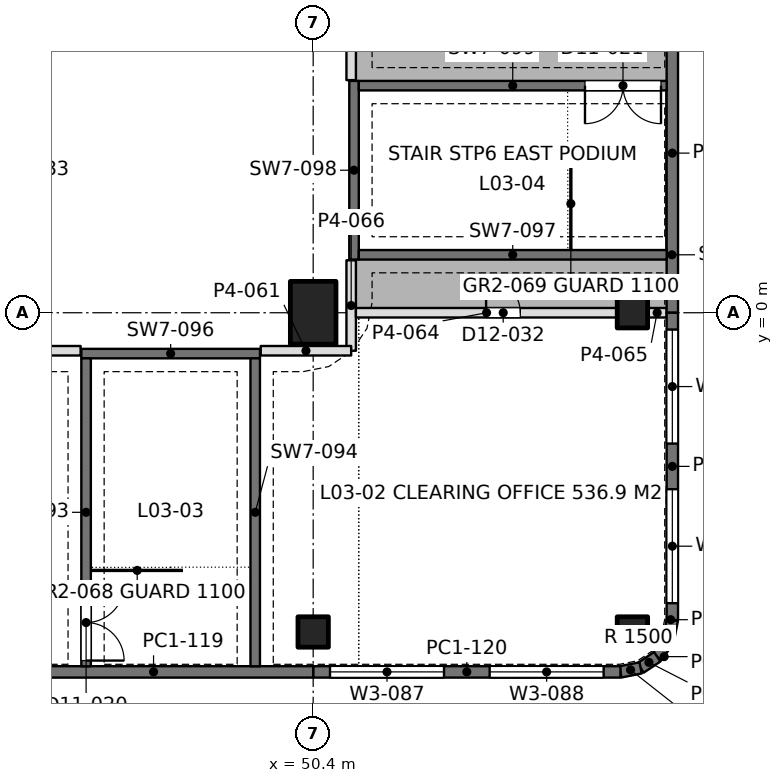
"""IFC4 building model, lengths in metres.
Left out: names, types, materials, properties, quantities, classifications, styles, units other than length and angle.
Written with IfcOpenShell. Run it as: python <this file> out.ifc"""

import sys

from ifc_helpers import new_model, si_unit, direction, frame, frame_2d, origin, origin_2d, place, context, subcontext, project, spatial, rectangle, extrude, element, fill, save


model = new_model("IFC4")
c1 = context("Model", 3, precision=1e-05, world=origin(), true_north=direction((0.0, 1.0)))
c2 = subcontext(c1, "Body", "Model", "MODEL_VIEW")
j1 = project(units=[si_unit("LENGTHUNIT", "METRE"), si_unit("PLANEANGLEUNIT", "RADIAN")], contexts=[c1])
p1 = place(None, origin())
s1 = spatial("IfcSite", under=j1, at=p1, CompositionType="ELEMENT")
p2 = place(p1, origin())
s2 = spatial("IfcBuilding", under=s1, at=p2, CompositionType="ELEMENT")
p3 = place(p2, frame((0.0, 0.0, 14.4)))
s3 = spatial("IfcBuildingStorey", under=s2, at=p3, CompositionType="ELEMENT", Elevation=14.4)
p4 = place(p3, frame((50.4, -8.4, 0.0), z_axis=(0.0, 0.0, 1.0), x_axis=(1.0, 0.0, 0.0)))
e1 = element("IfcColumn", 1, at=p4, inside=s3, PredefinedType="COLUMN", context=c2, shape_type="SweptSolid", body=[
    extrude(rectangle(XDim=0.8, YDim=0.8, at=origin_2d()), origin(), (0.0, 0.0, 1.0), 4.5),
])
p5 = place(p3, frame((50.4, 0.0, 0.0), z_axis=(0.0, 0.0, 1.0), x_axis=(1.0, 0.0, 0.0)))
e2 = element("IfcColumn", 2, at=p5, inside=s3, PredefinedType="COLUMN", context=c2, shape_type="SweptSolid", body=[
    extrude(rectangle(XDim=1.2, YDim=1.65, at=origin_2d()), origin(), (0.0, 0.0, 1.0), 4.5),
])
for number, where, z_axis, x_axis in (
    (3, (58.8, -8.4, 0.0), (0.0, 0.0, 1.0), (1.0, 0.0, 0.0)),
    (4, (58.8, 0.0, 0.0), (0.0, 0.0, 1.0), (1.0, 0.0, 0.0)),
):
    element("IfcColumn", number, at=place(p3, frame(where, z_axis=z_axis, x_axis=x_axis)), inside=s3, PredefinedType="COLUMN", context=c2, shape_type="SweptSolid", body=[
        extrude(rectangle(XDim=0.8, YDim=0.8, at=origin_2d()), origin(), (0.0, 0.0, 1.0), 4.5),
    ])
p6 = place(p3, frame((58.485, -9.45, 0.0), z_axis=(0.0, 0.0, 1.0), x_axis=(-1.0, 0.0, 0.0)))
e5 = element("IfcWall", 5, at=p6, inside=s3, PredefinedType="SOLIDWALL", context=c2, shape_type="SweptSolid", body=[
    extrude(rectangle(XDim=8.085, YDim=0.3, at=frame_2d((4.042, 0.0))), origin(), (0.0, 0.0, 1.0), 4.25),
])
p7 = place(p6, frame((0.443, 0.0, 0.9)))
e6 = element("IfcOpeningElement", 6, at=p7, cuts=e5, PredefinedType="OPENING", context=c2, shape_type="SweptSolid", body=[
    extrude(rectangle(XDim=3.0, YDim=2.4, at=frame_2d((1.5, 1.2))), frame((0.0, 0.16, 0.0), z_axis=(0.0, -1.0, 0.0), x_axis=(1.0, 0.0, 0.0)), (0.0, 0.0, 1.0), 0.32),
])
p8 = place(p6, frame((4.643, 0.0, 0.9)))
e7 = element("IfcOpeningElement", 7, at=p8, cuts=e5, PredefinedType="OPENING", context=c2, shape_type="SweptSolid", body=[
    extrude(rectangle(XDim=3.0, YDim=2.4, at=frame_2d((1.5, 1.2))), frame((0.0, 0.16, 0.0), z_axis=(0.0, -1.0, 0.0), x_axis=(1.0, 0.0, 0.0)), (0.0, 0.0, 1.0), 0.32),
])
for number, where, z_axis, x_axis in (
    (8, (50.4, -9.45, 0.0), (0.0, 0.0, 1.0), (-1.0, 0.0, 0.0)),
    (9, (59.85, 8.4, 0.0), (0.0, 0.0, 1.0), (0.0, -1.0, 0.0)),
):
    element("IfcWall", number, at=place(p3, frame(where, z_axis=z_axis, x_axis=x_axis)), inside=s3, PredefinedType="SOLIDWALL", context=c2, shape_type="SweptSolid", body=[
        extrude(rectangle(XDim=8.4, YDim=0.3, at=frame_2d((4.2, 0.0))), origin(), (0.0, 0.0, 1.0), 4.25),
    ])
p9 = place(p3, frame((59.85, 0.0, 0.0), z_axis=(0.0, 0.0, 1.0), x_axis=(0.0, -1.0, 0.0)))
e10 = element("IfcWall", 10, at=p9, inside=s3, PredefinedType="SOLIDWALL", context=c2, shape_type="SweptSolid", body=[
    extrude(rectangle(XDim=8.085, YDim=0.3, at=frame_2d((4.042, 0.0))), origin(), (0.0, 0.0, 1.0), 4.25),
])
p10 = place(p9, frame((0.443, 0.0, 0.9)))
e11 = element("IfcOpeningElement", 11, at=p10, cuts=e10, PredefinedType="OPENING", context=c2, shape_type="SweptSolid", body=[
    extrude(rectangle(XDim=3.0, YDim=2.4, at=frame_2d((1.5, 1.2))), frame((0.0, 0.16, 0.0), z_axis=(0.0, -1.0, 0.0), x_axis=(1.0, 0.0, 0.0)), (0.0, 0.0, 1.0), 0.32),
])
p11 = place(p9, frame((4.643, 0.0, 0.9)))
e12 = element("IfcOpeningElement", 12, at=p11, cuts=e10, PredefinedType="OPENING", context=c2, shape_type="SweptSolid", body=[
    extrude(rectangle(XDim=3.0, YDim=2.4, at=frame_2d((1.5, 1.2))), frame((0.0, 0.16, 0.0), z_axis=(0.0, -1.0, 0.0), x_axis=(1.0, 0.0, 0.0)), (0.0, 0.0, 1.0), 0.32),
])
p12 = place(p3, frame((59.85, -8.085, 0.0), z_axis=(0.0, 0.0, 1.0), x_axis=(-0.1955082817, -0.980702050465, 0.0)))
e13 = element("IfcWall", 13, at=p12, inside=s3, PredefinedType="SOLIDWALL", context=c2, shape_type="SweptSolid", body=[
    extrude(rectangle(XDim=0.541, YDim=0.3, at=frame_2d((0.271, 0.0))), origin(), (0.0, 0.0, 1.0), 4.25),
])
p13 = place(p3, frame((59.744, -8.615, 0.0), z_axis=(0.0, 0.0, 1.0), x_axis=(-0.555236195849, -0.831692711774, 0.0)))
e14 = element("IfcWall", 14, at=p13, inside=s3, PredefinedType="SOLIDWALL", context=c2, shape_type="SweptSolid", body=[
    extrude(rectangle(XDim=0.525, YDim=0.3, at=frame_2d((0.263, 0.0))), origin(), (0.0, 0.0, 1.0), 4.25),
])
p14 = place(p3, frame((59.453, -9.052, 0.0), z_axis=(0.0, 0.0, 1.0), x_axis=(-0.831621430339, -0.55534295404, 0.0)))
e15 = element("IfcWall", 15, at=p14, inside=s3, PredefinedType="SOLIDWALL", context=c2, shape_type="SweptSolid", body=[
    extrude(rectangle(XDim=0.526, YDim=0.3, at=frame_2d((0.263, 0.0))), origin(), (0.0, 0.0, 1.0), 4.25),
])
p15 = place(p3, frame((59.015, -9.344, 0.0), z_axis=(0.0, 0.0, 1.0), x_axis=(-0.980788534345, -0.195073962632, 0.0)))
e16 = element("IfcWall", 16, at=p15, inside=s3, PredefinedType="SOLIDWALL", context=c2, shape_type="SweptSolid", body=[
    extrude(rectangle(XDim=0.541, YDim=0.3, at=frame_2d((0.271, 0.0))), origin(), (0.0, 0.0, 1.0), 4.25),
])
p16 = place(p3, frame((6.12, -1.0, 0.0), z_axis=(0.0, 0.0, 1.0), x_axis=(1.0, 0.0, 0.0)))
e17 = element("IfcWall", 17, at=p16, inside=s3, PredefinedType="PARTITIONING", context=c2, shape_type="SweptSolid", body=[
    extrude(rectangle(XDim=38.16, YDim=0.25, at=frame_2d((19.08, 0.0))), origin(), (0.0, 0.0, 1.0), 3.45),
])
p17 = place(p16, frame((13.88, 0.0, 0.0)))
e18 = element("IfcOpeningElement", 18, at=p17, cuts=e17, PredefinedType="OPENING", context=c2, shape_type="SweptSolid", body=[
    extrude(rectangle(XDim=2.0, YDim=2.4, at=frame_2d((1.0, 1.2))), frame((0.0, 0.135, 0.0), z_axis=(0.0, -1.0, 0.0), x_axis=(1.0, 0.0, 0.0)), (0.0, 0.0, 1.0), 0.27),
])
p18 = place(p16, frame((22.28, 0.0, 0.0)))
e19 = element("IfcOpeningElement", 19, at=p18, cuts=e17, PredefinedType="OPENING", context=c2, shape_type="SweptSolid", body=[
    extrude(rectangle(XDim=2.0, YDim=2.4, at=frame_2d((1.0, 1.2))), frame((0.0, 0.135, 0.0), z_axis=(0.0, -1.0, 0.0), x_axis=(1.0, 0.0, 0.0)), (0.0, 0.0, 1.0), 0.27),
])
p19 = place(p3, frame((49.02, -1.0, 0.0), z_axis=(0.0, 0.0, 1.0), x_axis=(1.0, 0.0, 0.0)))
e20 = element("IfcWall", 20, at=p19, inside=s3, PredefinedType="PARTITIONING", context=c2, shape_type="SweptSolid", body=[
    extrude(rectangle(XDim=2.38, YDim=0.25, at=frame_2d((1.19, 0.0))), origin(), (0.0, 0.0, 1.0), 3.6),
])
p20 = place(p3, frame((51.524, 0.0, 0.0), z_axis=(0.0, 0.0, 1.0), x_axis=(1.0, 0.0, 0.0)))
e21 = element("IfcWall", 21, at=p20, inside=s3, PredefinedType="PARTITIONING", context=c2, shape_type="SweptSolid", body=[
    extrude(rectangle(XDim=6.877, YDim=0.25, at=frame_2d((3.438, 0.0))), origin(), (0.0, 0.0, 1.0), 3.6),
])
p21 = place(p20, frame((3.426, 0.0, 0.0)))
e22 = element("IfcOpeningElement", 22, at=p21, cuts=e21, PredefinedType="OPENING", context=c2, shape_type="SweptSolid", body=[
    extrude(rectangle(XDim=0.9, YDim=2.2, at=frame_2d((0.45, 1.1))), frame((0.0, 0.135, 0.0), z_axis=(0.0, -1.0, 0.0), x_axis=(1.0, 0.0, 0.0)), (0.0, 0.0, 1.0), 0.27),
])
p22 = place(p3, frame((59.199, 0.0, 0.0), z_axis=(0.0, 0.0, 1.0), x_axis=(1.0, 0.0, 0.0)))
e23 = element("IfcWall", 23, at=p22, inside=s3, PredefinedType="PARTITIONING", context=c2, shape_type="SweptSolid", body=[
    extrude(rectangle(XDim=0.503, YDim=0.25, at=frame_2d((0.251, 0.0))), origin(), (0.0, 0.0, 1.0), 4.25),
])
p23 = place(p3, frame((51.4, -1.0, 0.0), z_axis=(0.0, 0.0, 1.0), x_axis=(0.0, 1.0, 0.0)))
e24 = element("IfcWall", 24, at=p23, inside=s3, PredefinedType="PARTITIONING", context=c2, shape_type="SweptSolid", body=[
    extrude(rectangle(XDim=2.38, YDim=0.25, at=frame_2d((1.19, 0.0))), origin(), (0.0, 0.0, 1.0), 3.6),
])
p24 = place(p3, frame((51.4, 6.12, 0.0), z_axis=(0.0, 0.0, 1.0), x_axis=(0.0, 1.0, 0.0)))
e25 = element("IfcWall", 25, at=p24, inside=s3, PredefinedType="PARTITIONING", context=c2, shape_type="SweptSolid", body=[
    extrude(rectangle(XDim=6.482, YDim=0.25, at=frame_2d((3.241, 0.0))), origin(), (0.0, 0.0, 1.0), 3.45),
])
p25 = place(p24, frame((3.93, 0.0, 0.0)))
e26 = element("IfcOpeningElement", 26, at=p25, cuts=e25, PredefinedType="OPENING", context=c2, shape_type="SweptSolid", body=[
    extrude(rectangle(XDim=0.9, YDim=2.2, at=frame_2d((0.45, 1.1))), frame((0.0, 0.135, 0.0), z_axis=(0.0, -1.0, 0.0), x_axis=(1.0, 0.0, 0.0)), (0.0, 0.0, 1.0), 0.27),
])
p26 = place(p3, frame((44.425, -9.302, 0.0), z_axis=(0.0, 0.0, 1.0), x_axis=(0.0, 1.0, 0.0)))
e27 = element("IfcWall", 27, at=p26, inside=s3, PredefinedType="SOLIDWALL", context=c2, shape_type="SweptSolid", body=[
    extrude(rectangle(XDim=8.102, YDim=0.25, at=frame_2d((4.051, 0.0))), origin(), (0.0, 0.0, 1.0), 4.5),
])
p27 = place(p26, frame((0.15, 0.0, 0.0)))
e28 = element("IfcOpeningElement", 28, at=p27, cuts=e27, PredefinedType="OPENING", context=c2, shape_type="SweptSolid", body=[
    extrude(rectangle(XDim=2.0, YDim=2.2, at=frame_2d((1.0, 1.1))), frame((0.0, 0.135, 0.0), z_axis=(0.0, -1.0, 0.0), x_axis=(1.0, 0.0, 0.0)), (0.0, 0.0, 1.0), 0.27),
])
p28 = place(p3, frame((48.875, -9.302, 0.0), z_axis=(0.0, 0.0, 1.0), x_axis=(0.0, 1.0, 0.0)))
e29 = element("IfcWall", 29, at=p28, inside=s3, PredefinedType="SOLIDWALL", context=c2, shape_type="SweptSolid", body=[
    extrude(rectangle(XDim=8.102, YDim=0.25, at=frame_2d((4.051, 0.0))), origin(), (0.0, 0.0, 1.0), 4.5),
])
p29 = place(p3, frame((44.3, -1.075, 0.0), z_axis=(0.0, 0.0, 1.0), x_axis=(1.0, 0.0, 0.0)))
e30 = element("IfcWall", 30, at=p29, inside=s3, PredefinedType="SOLIDWALL", context=c2, shape_type="SweptSolid", body=[
    extrude(rectangle(XDim=4.7, YDim=0.25, at=frame_2d((2.35, 0.0))), origin(), (0.0, 0.0, 1.0), 4.5),
])
p30 = place(p3, frame((59.702, 1.525, 0.0), z_axis=(0.0, 0.0, 1.0), x_axis=(-1.0, 0.0, 0.0)))
e31 = element("IfcWall", 31, at=p30, inside=s3, PredefinedType="SOLIDWALL", context=c2, shape_type="SweptSolid", body=[
    extrude(rectangle(XDim=8.102, YDim=0.25, at=frame_2d((4.051, 0.0))), origin(), (0.0, 0.0, 1.0), 4.5),
])
p31 = place(p3, frame((59.702, 5.975, 0.0), z_axis=(0.0, 0.0, 1.0), x_axis=(-1.0, 0.0, 0.0)))
e32 = element("IfcWall", 32, at=p31, inside=s3, PredefinedType="SOLIDWALL", context=c2, shape_type="SweptSolid", body=[
    extrude(rectangle(XDim=8.102, YDim=0.25, at=frame_2d((4.051, 0.0))), origin(), (0.0, 0.0, 1.0), 4.5),
])
p32 = place(p31, frame((0.15, 0.0, 0.0)))
e33 = element("IfcOpeningElement", 33, at=p32, cuts=e32, PredefinedType="OPENING", context=c2, shape_type="SweptSolid", body=[
    extrude(rectangle(XDim=2.0, YDim=2.2, at=frame_2d((1.0, 1.1))), frame((0.0, 0.135, 0.0), z_axis=(0.0, -1.0, 0.0), x_axis=(1.0, 0.0, 0.0)), (0.0, 0.0, 1.0), 0.27),
])
p33 = place(p3, frame((51.475, 1.4, 0.0), z_axis=(0.0, 0.0, 1.0), x_axis=(0.0, 1.0, 0.0)))
e34 = element("IfcWall", 34, at=p33, inside=s3, PredefinedType="SOLIDWALL", context=c2, shape_type="SweptSolid", body=[
    extrude(rectangle(XDim=4.7, YDim=0.25, at=frame_2d((2.35, 0.0))), origin(), (0.0, 0.0, 1.0), 4.5),
])
p34 = place(p7, origin())
e35 = element("IfcWindow", 35, at=p34, inside=s3, PartitioningType="SINGLE_PANEL", PredefinedType="WINDOW", context=c2, shape_type="SweptSolid", body=[
    extrude(rectangle(XDim=3.0, YDim=2.4, at=frame_2d((1.5, 1.2))), frame((0.0, 0.03, 0.0), z_axis=(0.0, -1.0, 0.0), x_axis=(1.0, 0.0, 0.0)), (0.0, 0.0, 1.0), 0.06),
])
fill(e6, e35)
p35 = place(p8, origin())
e36 = element("IfcWindow", 36, at=p35, inside=s3, PartitioningType="SINGLE_PANEL", PredefinedType="WINDOW", context=c2, shape_type="SweptSolid", body=[
    extrude(rectangle(XDim=3.0, YDim=2.4, at=frame_2d((1.5, 1.2))), frame((0.0, 0.03, 0.0), z_axis=(0.0, -1.0, 0.0), x_axis=(1.0, 0.0, 0.0)), (0.0, 0.0, 1.0), 0.06),
])
fill(e7, e36)
p36 = place(p10, origin())
e37 = element("IfcWindow", 37, at=p36, inside=s3, PartitioningType="SINGLE_PANEL", PredefinedType="WINDOW", context=c2, shape_type="SweptSolid", body=[
    extrude(rectangle(XDim=3.0, YDim=2.4, at=frame_2d((1.5, 1.2))), frame((0.0, 0.03, 0.0), z_axis=(0.0, -1.0, 0.0), x_axis=(1.0, 0.0, 0.0)), (0.0, 0.0, 1.0), 0.06),
])
fill(e11, e37)
p37 = place(p11, origin())
e38 = element("IfcWindow", 38, at=p37, inside=s3, PartitioningType="SINGLE_PANEL", PredefinedType="WINDOW", context=c2, shape_type="SweptSolid", body=[
    extrude(rectangle(XDim=3.0, YDim=2.4, at=frame_2d((1.5, 1.2))), frame((0.0, 0.03, 0.0), z_axis=(0.0, -1.0, 0.0), x_axis=(1.0, 0.0, 0.0)), (0.0, 0.0, 1.0), 0.06),
])
fill(e12, e38)
p38 = place(p21, origin())
e39 = element("IfcDoor", 39, at=p38, inside=s3, OperationType="SINGLE_SWING_LEFT", PredefinedType="DOOR", context=c2, shape_type="SweptSolid", body=[
    extrude(rectangle(XDim=0.9, YDim=2.2, at=frame_2d((0.45, 1.1))), frame((0.0, 0.025, 0.0), z_axis=(0.0, -1.0, 0.0), x_axis=(1.0, 0.0, 0.0)), (0.0, 0.0, 1.0), 0.05),
])
fill(e22, e39)
p39 = place(p27, frame((2.0, 0.0, 0.0), z_axis=(0.0, 0.0, 1.0), x_axis=(-1.0, 0.0, 0.0)))
e40 = element("IfcDoor", 40, at=p39, inside=s3, OperationType="DOUBLE_DOOR_SINGLE_SWING", PredefinedType="DOOR", context=c2, shape_type="SweptSolid", body=[
    extrude(rectangle(XDim=2.0, YDim=2.2, at=frame_2d((1.0, 1.1))), frame((0.0, 0.025, 0.0), z_axis=(0.0, -1.0, 0.0), x_axis=(1.0, 0.0, 0.0)), (0.0, 0.0, 1.0), 0.05),
])
fill(e28, e40)
p40 = place(p32, origin())
e41 = element("IfcDoor", 41, at=p40, inside=s3, OperationType="DOUBLE_DOOR_SINGLE_SWING", PredefinedType="DOOR", context=c2, shape_type="SweptSolid", body=[
    extrude(rectangle(XDim=2.0, YDim=2.2, at=frame_2d((1.0, 1.1))), frame((0.0, 0.025, 0.0), z_axis=(0.0, -1.0, 0.0), x_axis=(1.0, 0.0, 0.0)), (0.0, 0.0, 1.0), 0.05),
])
fill(e33, e41)
save(model, sys.argv[1])
